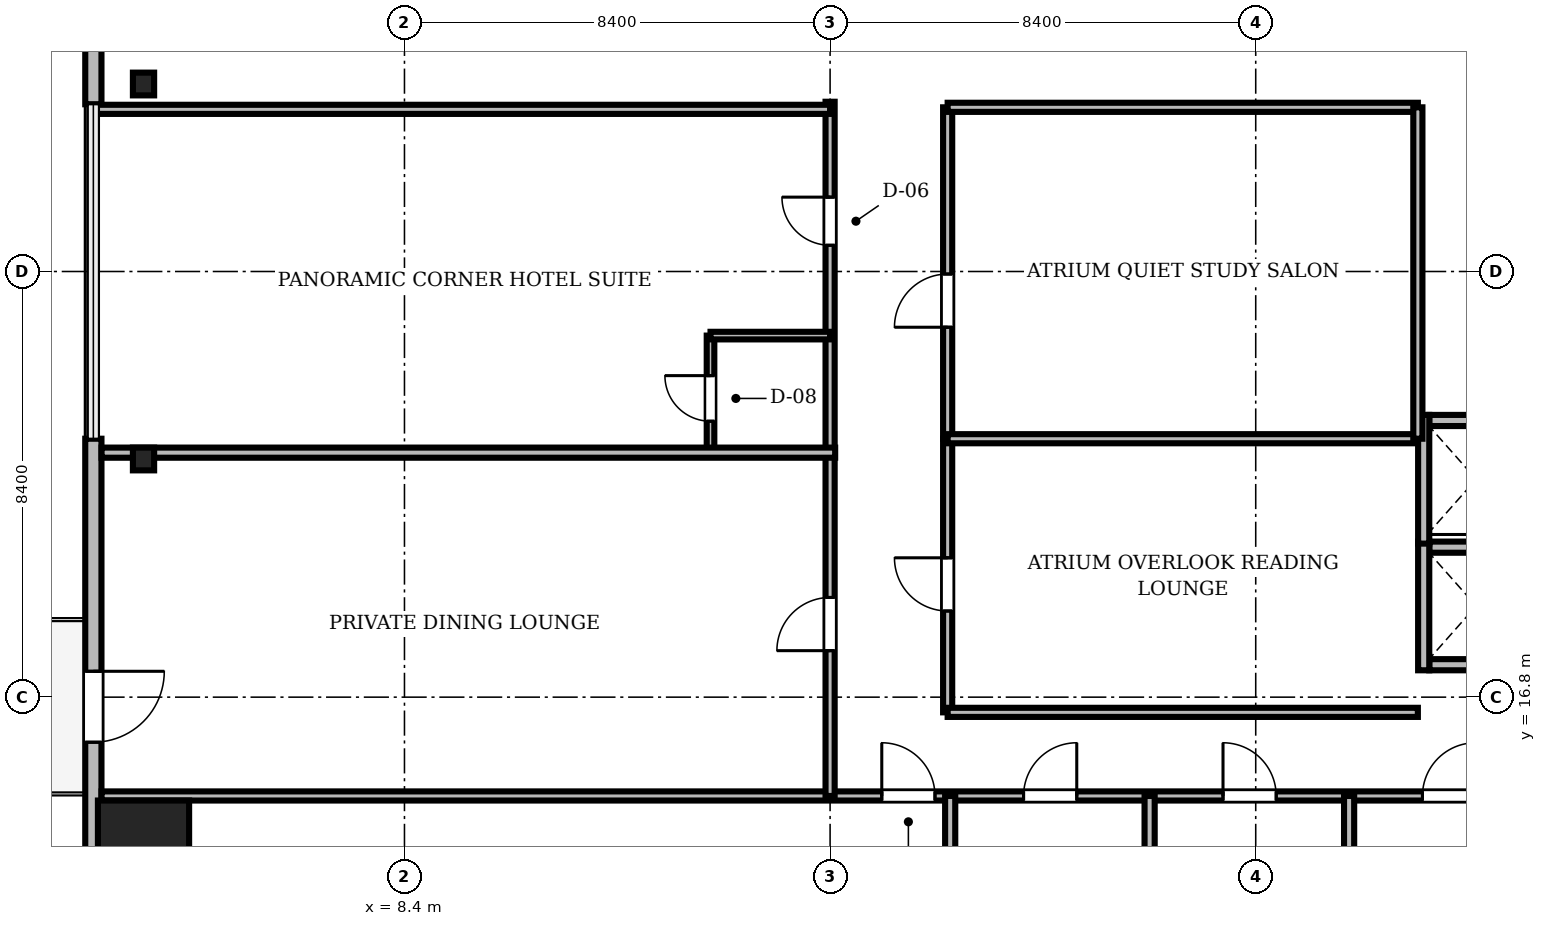
"""IFC4 building model, lengths in metres.
Left out: names, types, materials, properties, quantities, classifications, styles, units other than length and angle.
Written with IfcOpenShell. Run it as: python <this file> out.ifc"""

import sys

from ifc_helpers import new_model, si_unit, direction, frame, frame_2d, origin, origin_2d, place, context, subcontext, project, spatial, rectangle, i_section, extrude, source, transform, mapped, element, fill, save


model = new_model("IFC4")
c1 = context("Model", 3, precision=1e-05, world=origin(), true_north=direction((0.0, 1.0)))
c2 = subcontext(c1, "Body", "Model", "MODEL_VIEW")
j1 = project(units=[si_unit("LENGTHUNIT", "METRE"), si_unit("PLANEANGLEUNIT", "RADIAN")], contexts=[c1])
p1 = place(None, origin())
s1 = spatial("IfcSite", under=j1, at=p1, CompositionType="ELEMENT")
p2 = place(p1, origin())
s2 = spatial("IfcBuilding", under=s1, at=p2, CompositionType="ELEMENT")
p3 = place(p2, frame((0.0, 0.0, 53.15)))
s3 = spatial("IfcBuildingStorey", under=s2, at=p3, CompositionType="ELEMENT", Elevation=53.15)
m1 = source(origin(), c2, "Body", "SweptSolid", [
    extrude(rectangle(XDim=1.8, YDim=1.8, at=origin_2d()), origin(), (0.0, 0.0, 1.0), 3.41),
])
p4 = place(p3, frame((3.25, 13.86, 0.0), z_axis=(0.0, 0.0, 1.0), x_axis=(1.0, 0.0, 0.0)))
e1 = element("IfcColumn", 1, at=p4, inside=s3, PredefinedType="COLUMN", context=c2, shape_type="MappedRepresentation", body=[
    mapped(m1, transform((0.0, 0.0, 0.0), scale=1.0)),
])
m2 = source(origin(), c2, "Body", "SweptSolid", [
    extrude(i_section(OverallWidth=0.419, OverallDepth=0.449, WebThickness=0.031, FlangeThickness=0.048, FilletRadius=0.015, at=origin_2d()), origin(), (0.0, 0.0, 1.0), 3.41),
])
for number, where, z_axis, x_axis in (
    (2, (3.25, 28.9, 0.0), (0.0, 0.0, 1.0), (1.0, 0.0, 0.0)),
    (3, (3.25, 21.5, 0.0), (0.0, 0.0, 1.0), (1.0, 0.0, 0.0)),
):
    element("IfcColumn", number, at=place(p3, frame(where, z_axis=z_axis, x_axis=x_axis)), inside=s3, PredefinedType="COLUMN", context=c2, shape_type="MappedRepresentation", body=[
        mapped(m2, transform((0.0, 0.0, 0.0), scale=1.0)),
    ])
m3 = source(origin(), c2, "Body", "SweptSolid", [
    extrude(rectangle(XDim=15.6, YDim=0.32, at=frame_2d((7.8, 0.0))), origin(), (0.0, 0.0, 1.0), 3.41),
])
p5 = place(p3, frame((2.26, 44.1, 0.0), z_axis=(0.0, 0.0, 1.0), x_axis=(0.0, -1.0, 0.0)))
e4 = element("IfcWall", 4, at=p5, inside=s3, PredefinedType="SOLIDWALL", context=c2, shape_type="MappedRepresentation", body=[
    mapped(m3, transform((0.0, 0.0, 0.0), scale=1.0)),
])
m4 = source(origin(), c2, "Body", "SweptSolid", [
    extrude(rectangle(XDim=2.2, YDim=2.4, at=frame_2d((1.1, 1.2))), frame((0.0, 0.17, 0.0), z_axis=(0.0, -1.0, 0.0), x_axis=(1.0, 0.0, 0.0)), (0.0, 0.0, 1.0), 0.34),
])
p6 = place(p5, frame((3.005, 0.0, 0.72)))
e5 = element("IfcOpeningElement", 5, at=p6, cuts=e4, PredefinedType="OPENING", context=c2, shape_type="MappedRepresentation", body=[
    mapped(m4, transform((0.0, 0.0, 0.0), scale=1.0)),
])
m5 = source(origin(), c2, "Body", "SweptSolid", [
    extrude(rectangle(XDim=15.6, YDim=0.32, at=frame_2d((7.8, 0.0))), origin(), (0.0, 0.0, 1.0), 3.41),
])
p7 = place(p3, frame((2.26, 21.9, 0.0), z_axis=(0.0, 0.0, 1.0), x_axis=(0.0, -1.0, 0.0)))
e6 = element("IfcWall", 6, at=p7, inside=s3, PredefinedType="SOLIDWALL", context=c2, shape_type="MappedRepresentation", body=[
    mapped(m5, transform((0.0, 0.0, 0.0), scale=1.0)),
])
m6 = source(origin(), c2, "Body", "SweptSolid", [
    extrude(rectangle(XDim=1.4, YDim=2.3, at=frame_2d((0.7, 1.15))), frame((0.0, 0.17, 0.0), z_axis=(0.0, -1.0, 0.0), x_axis=(1.0, 0.0, 0.0)), (0.0, 0.0, 1.0), 0.34),
])
p8 = place(p7, frame((4.59, 0.0, 0.0)))
e7 = element("IfcOpeningElement", 7, at=p8, cuts=e6, PredefinedType="OPENING", context=c2, shape_type="MappedRepresentation", body=[
    mapped(m6, transform((0.0, 0.0, 0.0), scale=1.0)),
])
p9 = place(p7, frame((10.395, 0.0, 0.72)))
e8 = element("IfcOpeningElement", 8, at=p9, cuts=e6, PredefinedType="OPENING", context=c2, shape_type="MappedRepresentation", body=[
    mapped(m4, transform((0.0, 0.0, 0.0), scale=1.0)),
])
m7 = source(origin(), c2, "Body", "SweptSolid", [
    extrude(rectangle(XDim=1.85, YDim=0.22, at=frame_2d((0.925, 0.0))), origin(), (0.0, 0.0, 1.0), 3.41),
])
for number, where, z_axis, x_axis in (
    (9, (28.625, 17.44, 0.0), (0.0, 0.0, 1.0), (1.0, 0.0, 0.0)),
    (10, (28.625, 19.76, 0.0), (0.0, 0.0, 1.0), (1.0, 0.0, 0.0)),
):
    element("IfcWall", number, at=place(p3, frame(where, z_axis=z_axis, x_axis=x_axis)), inside=s3, PredefinedType="SOLIDWALL", context=c2, shape_type="MappedRepresentation", body=[
        mapped(m7, transform((0.0, 0.0, 0.0), scale=1.0)),
    ])
m8 = source(origin(), c2, "Body", "SweptSolid", [
    extrude(rectangle(XDim=2.54, YDim=0.22, at=frame_2d((1.27, 0.0))), origin(), (0.0, 0.0, 1.0), 3.41),
])
p10 = place(p3, frame((28.515, 17.33, 0.0), z_axis=(0.0, 0.0, 1.0), x_axis=(0.0, 1.0, 0.0)))
e11 = element("IfcWall", 11, at=p10, inside=s3, PredefinedType="SOLIDWALL", context=c2, shape_type="MappedRepresentation", body=[
    mapped(m8, transform((0.0, 0.0, 0.0), scale=1.0)),
])
p11 = place(p3, frame((28.625, 22.26, 0.0), z_axis=(0.0, 0.0, 1.0), x_axis=(1.0, 0.0, 0.0)))
e12 = element("IfcWall", 12, at=p11, inside=s3, PredefinedType="SOLIDWALL", context=c2, shape_type="MappedRepresentation", body=[
    mapped(m7, transform((0.0, 0.0, 0.0), scale=1.0)),
])
p12 = place(p3, frame((28.515, 19.83, 0.0), z_axis=(0.0, 0.0, 1.0), x_axis=(0.0, 1.0, 0.0)))
e13 = element("IfcWall", 13, at=p12, inside=s3, PredefinedType="SOLIDWALL", context=c2, shape_type="MappedRepresentation", body=[
    mapped(m8, transform((0.0, 0.0, 0.0), scale=1.0)),
])
m9 = source(origin(), c2, "Body", "SweptSolid", [
    extrude(rectangle(XDim=46.156, YDim=0.18, at=frame_2d((23.078, 0.0))), origin(), (0.0, 0.0, 1.0), 2.652),
])
p13 = place(p3, frame((2.422, 14.85, 0.0), z_axis=(0.0, 0.0, 1.0), x_axis=(1.0, 0.0, 0.0)))
e14 = element("IfcWall", 14, at=p13, inside=s3, PredefinedType="PARTITIONING", context=c2, shape_type="MappedRepresentation", body=[
    mapped(m9, transform((0.0, 0.0, 0.0), scale=1.0)),
])
m10 = source(origin(), c2, "Body", "SweptSolid", [
    extrude(rectangle(XDim=1.05, YDim=2.2, at=frame_2d((0.525, 1.1))), frame((0.0, 0.1, 0.0), z_axis=(0.0, -1.0, 0.0), x_axis=(1.0, 0.0, 0.0)), (0.0, 0.0, 1.0), 0.2),
])
p14 = place(p13, frame((15.398, 0.0, 0.0)))
e15 = element("IfcOpeningElement", 15, at=p14, cuts=e14, PredefinedType="OPENING", context=c2, shape_type="MappedRepresentation", body=[
    mapped(m10, transform((0.0, 0.0, 0.0), scale=1.0)),
])
p15 = place(p13, frame((18.196, 0.0, 0.0)))
e16 = element("IfcOpeningElement", 16, at=p15, cuts=e14, PredefinedType="OPENING", context=c2, shape_type="MappedRepresentation", body=[
    mapped(m10, transform((0.0, 0.0, 0.0), scale=1.0)),
])
p16 = place(p13, frame((22.132, 0.0, 0.0)))
e17 = element("IfcOpeningElement", 17, at=p16, cuts=e14, PredefinedType="OPENING", context=c2, shape_type="MappedRepresentation", body=[
    mapped(m10, transform((0.0, 0.0, 0.0), scale=1.0)),
])
p17 = place(p13, frame((26.069, 0.0, 0.0)))
e18 = element("IfcOpeningElement", 18, at=p17, cuts=e14, PredefinedType="OPENING", context=c2, shape_type="MappedRepresentation", body=[
    mapped(m10, transform((0.0, 0.0, 0.0), scale=1.0)),
])
p18 = place(p13, frame((30.192, 0.0, 0.0)))
e19 = element("IfcOpeningElement", 19, at=p18, cuts=e14, PredefinedType="OPENING", context=c2, shape_type="MappedRepresentation", body=[
    mapped(m10, transform((0.0, 0.0, 0.0), scale=1.0)),
])
p19 = place(p13, frame((34.128, 0.0, 0.0)))
e20 = element("IfcOpeningElement", 20, at=p19, cuts=e14, PredefinedType="OPENING", context=c2, shape_type="MappedRepresentation", body=[
    mapped(m10, transform((0.0, 0.0, 0.0), scale=1.0)),
])
p20 = place(p13, frame((37.877, 0.0, 0.0)))
e21 = element("IfcOpeningElement", 21, at=p20, cuts=e14, PredefinedType="OPENING", context=c2, shape_type="MappedRepresentation", body=[
    mapped(m10, transform((0.0, 0.0, 0.0), scale=1.0)),
])
p21 = place(p13, frame((42.727, 0.0, 0.0)))
e22 = element("IfcOpeningElement", 22, at=p21, cuts=e14, PredefinedType="OPENING", context=c2, shape_type="MappedRepresentation", body=[
    mapped(m10, transform((0.0, 0.0, 0.0), scale=1.0)),
])
m11 = source(origin(), c2, "Body", "SweptSolid", [
    extrude(rectangle(XDim=13.7, YDim=0.18, at=frame_2d((6.85, 0.0))), origin(), (0.0, 0.0, 1.0), 2.802),
])
p22 = place(p3, frame((16.8, 14.85, 0.0), z_axis=(0.0, 0.0, 1.0), x_axis=(0.0, 1.0, 0.0)))
e23 = element("IfcWall", 23, at=p22, inside=s3, PredefinedType="PARTITIONING", context=c2, shape_type="MappedRepresentation", body=[
    mapped(m11, transform((0.0, 0.0, 0.0), scale=1.0)),
])
p23 = place(p22, frame((2.867, 0.0, 0.0)))
e24 = element("IfcOpeningElement", 24, at=p23, cuts=e23, PredefinedType="OPENING", context=c2, shape_type="MappedRepresentation", body=[
    mapped(m10, transform((0.0, 0.0, 0.0), scale=1.0)),
])
m12 = source(origin(), c2, "Body", "SweptSolid", [
    extrude(rectangle(XDim=0.95, YDim=2.15, at=frame_2d((0.475, 1.075))), frame((0.0, 0.1, 0.0), z_axis=(0.0, -1.0, 0.0), x_axis=(1.0, 0.0, 0.0)), (0.0, 0.0, 1.0), 0.2),
])
p24 = place(p22, frame((10.867, 0.0, 0.0)))
e25 = element("IfcOpeningElement", 25, at=p24, cuts=e23, PredefinedType="OPENING", context=c2, shape_type="MappedRepresentation", body=[
    mapped(m12, transform((0.0, 0.0, 0.0), scale=1.0)),
])
m13 = source(origin(), c2, "Body", "SweptSolid", [
    extrude(rectangle(XDim=6.54, YDim=0.18, at=frame_2d((3.27, 0.0))), origin(), (0.0, 0.0, 1.0), 2.802),
])
p25 = place(p3, frame((19.12, 21.9, 0.0), z_axis=(0.0, 0.0, 1.0), x_axis=(0.0, 1.0, 0.0)))
e26 = element("IfcWall", 26, at=p25, inside=s3, PredefinedType="PARTITIONING", context=c2, shape_type="MappedRepresentation", body=[
    mapped(m13, transform((0.0, 0.0, 0.0), scale=1.0)),
])
p26 = place(p25, frame((2.2, 0.0, 0.0)))
e27 = element("IfcOpeningElement", 27, at=p26, cuts=e26, PredefinedType="OPENING", context=c2, shape_type="MappedRepresentation", body=[
    mapped(m10, transform((0.0, 0.0, 0.0), scale=1.0)),
])
m14 = source(origin(), c2, "Body", "SweptSolid", [
    extrude(rectangle(XDim=5.4, YDim=0.18, at=frame_2d((2.7, 0.0))), origin(), (0.0, 0.0, 1.0), 2.802),
])
p27 = place(p3, frame((19.12, 16.5, 0.0), z_axis=(0.0, 0.0, 1.0), x_axis=(0.0, 1.0, 0.0)))
e28 = element("IfcWall", 28, at=p27, inside=s3, PredefinedType="PARTITIONING", context=c2, shape_type="MappedRepresentation", body=[
    mapped(m14, transform((0.0, 0.0, 0.0), scale=1.0)),
])
p28 = place(p27, frame((2.0, 0.0, 0.0)))
e29 = element("IfcOpeningElement", 29, at=p28, cuts=e28, PredefinedType="OPENING", context=c2, shape_type="MappedRepresentation", body=[
    mapped(m10, transform((0.0, 0.0, 0.0), scale=1.0)),
])
m15 = source(origin(), c2, "Body", "SweptSolid", [
    extrude(rectangle(XDim=2.29, YDim=0.15, at=frame_2d((1.145, 0.0))), origin(), (0.0, 0.0, 1.0), 3.042),
])
p29 = place(p3, frame((14.44, 21.645, 0.0), z_axis=(0.0, 0.0, 1.0), x_axis=(0.0, 1.0, 0.0)))
e30 = element("IfcWall", 30, at=p29, inside=s3, PredefinedType="PARTITIONING", context=c2, shape_type="MappedRepresentation", body=[
    mapped(m15, transform((0.0, 0.0, 0.0), scale=1.0)),
])
m16 = source(origin(), c2, "Body", "SweptSolid", [
    extrude(rectangle(XDim=0.9, YDim=2.1, at=frame_2d((0.45, 1.05))), frame((0.0, 0.085, 0.0), z_axis=(0.0, -1.0, 0.0), x_axis=(1.0, 0.0, 0.0)), (0.0, 0.0, 1.0), 0.17),
])
p30 = place(p29, frame((0.6, 0.0, 0.0)))
e31 = element("IfcOpeningElement", 31, at=p30, cuts=e30, PredefinedType="OPENING", context=c2, shape_type="MappedRepresentation", body=[
    mapped(m16, transform((0.0, 0.0, 0.0), scale=1.0)),
])
m17 = source(origin(), c2, "Body", "SweptSolid", [
    extrude(rectangle(XDim=14.478, YDim=0.2, at=frame_2d((7.239, 0.0))), origin(), (0.0, 0.0, 1.0), 2.652),
])
p31 = place(p3, frame((2.422, 21.625, 0.0), z_axis=(0.0, 0.0, 1.0), x_axis=(1.0, 0.0, 0.0)))
e32 = element("IfcWall", 32, at=p31, inside=s3, PredefinedType="PARTITIONING", context=c2, shape_type="MappedRepresentation", body=[
    mapped(m17, transform((0.0, 0.0, 0.0), scale=1.0)),
])
m18 = source(origin(), c2, "Body", "SweptSolid", [
    extrude(rectangle(XDim=14.57, YDim=0.18, at=frame_2d((7.285, 0.0))), origin(), (0.0, 0.0, 1.0), 2.652),
])
p32 = place(p3, frame((2.23, 28.4, 0.0), z_axis=(0.0, 0.0, 1.0), x_axis=(1.0, 0.0, 0.0)))
e33 = element("IfcWall", 33, at=p32, inside=s3, PredefinedType="PARTITIONING", context=c2, shape_type="MappedRepresentation", body=[
    mapped(m18, transform((0.0, 0.0, 0.0), scale=1.0)),
])
m19 = source(origin(), c2, "Body", "SweptSolid", [
    extrude(rectangle(XDim=12.728, YDim=0.2, at=frame_2d((6.364, 0.0))), origin(), (0.0, 0.0, 1.0), 2.652),
])
p33 = place(p3, frame((19.17, 2.122, 0.0), z_axis=(0.0, 0.0, 1.0), x_axis=(0.0, 1.0, 0.0)))
e34 = element("IfcWall", 34, at=p33, inside=s3, PredefinedType="PARTITIONING", context=c2, shape_type="MappedRepresentation", body=[
    mapped(m19, transform((0.0, 0.0, 0.0), scale=1.0)),
])
m20 = source(origin(), c2, "Body", "SweptSolid", [
    extrude(rectangle(XDim=12.92, YDim=0.2, at=frame_2d((6.46, 0.0))), origin(), (0.0, 0.0, 1.0), 2.652),
])
for number, where, z_axis, x_axis in (
    (35, (23.106, 1.93, 0.0), (0.0, 0.0, 1.0), (0.0, 1.0, 0.0)),
    (36, (27.043, 1.93, 0.0), (0.0, 0.0, 1.0), (0.0, 1.0, 0.0)),
):
    element("IfcWall", number, at=place(p3, frame(where, z_axis=z_axis, x_axis=x_axis)), inside=s3, PredefinedType="PARTITIONING", context=c2, shape_type="MappedRepresentation", body=[
        mapped(m20, transform((0.0, 0.0, 0.0), scale=1.0)),
    ])
m21 = source(origin(), c2, "Body", "SweptSolid", [
    extrude(rectangle(XDim=9.28, YDim=0.18, at=frame_2d((4.64, 0.0))), origin(), (0.0, 0.0, 1.0), 2.802),
])
p34 = place(p3, frame((19.12, 16.5, 0.0), z_axis=(0.0, 0.0, 1.0), x_axis=(1.0, 0.0, 0.0)))
e37 = element("IfcWall", 37, at=p34, inside=s3, PredefinedType="PARTITIONING", context=c2, shape_type="MappedRepresentation", body=[
    mapped(m21, transform((0.0, 0.0, 0.0), scale=1.0)),
])
m22 = source(origin(), c2, "Body", "SweptSolid", [
    extrude(rectangle(XDim=9.28, YDim=0.18, at=frame_2d((4.64, 0.0))), origin(), (0.0, 0.0, 1.0), 3.41),
])
for number, where, z_axis, x_axis in (
    (38, (19.12, 21.9, 0.0), (0.0, 0.0, 1.0), (1.0, 0.0, 0.0)),
    (39, (19.12, 28.44, 0.0), (0.0, 0.0, 1.0), (1.0, 0.0, 0.0)),
):
    element("IfcWall", number, at=place(p3, frame(where, z_axis=z_axis, x_axis=x_axis)), inside=s3, PredefinedType="PARTITIONING", context=c2, shape_type="MappedRepresentation", body=[
        mapped(m22, transform((0.0, 0.0, 0.0), scale=1.0)),
    ])
p35 = place(p3, frame((28.4, 21.9, 0.0), z_axis=(0.0, 0.0, 1.0), x_axis=(0.0, 1.0, 0.0)))
e40 = element("IfcWall", 40, at=p35, inside=s3, PredefinedType="PARTITIONING", context=c2, shape_type="MappedRepresentation", body=[
    mapped(m13, transform((0.0, 0.0, 0.0), scale=1.0)),
])
m23 = source(origin(), c2, "Body", "SweptSolid", [
    extrude(rectangle(XDim=2.36, YDim=0.15, at=frame_2d((1.18, 0.0))), origin(), (0.0, 0.0, 1.0), 3.41),
])
p36 = place(p3, frame((14.44, 23.935, 0.0), z_axis=(0.0, 0.0, 1.0), x_axis=(1.0, 0.0, 0.0)))
e41 = element("IfcWall", 41, at=p36, inside=s3, PredefinedType="PARTITIONING", context=c2, shape_type="MappedRepresentation", body=[
    mapped(m23, transform((0.0, 0.0, 0.0), scale=1.0)),
])
m24 = source(origin(), c2, "Body", "SweptSolid", [
    extrude(rectangle(XDim=1.4, YDim=2.3, at=frame_2d((0.7, 1.15))), frame((0.0, 0.025, 0.0), z_axis=(0.0, -1.0, 0.0), x_axis=(1.0, 0.0, 0.0)), (0.0, 0.0, 1.0), 0.05),
])
p37 = place(p8, frame((1.4, 0.0, 0.0), z_axis=(0.0, 0.0, 1.0), x_axis=(-1.0, 0.0, 0.0)))
e42 = element("IfcDoor", 42, at=p37, inside=s3, OperationType="DOUBLE_DOOR_SLIDING", PredefinedType="DOOR", context=c2, shape_type="MappedRepresentation", body=[
    mapped(m24, transform((0.0, 0.0, 0.0), scale=1.0)),
])
fill(e7, e42)
m25 = source(origin(), c2, "Body", "SweptSolid", [
    extrude(rectangle(XDim=1.05, YDim=2.2, at=frame_2d((0.525, 1.1))), frame((0.0, 0.025, 0.0), z_axis=(0.0, -1.0, 0.0), x_axis=(1.0, 0.0, 0.0)), (0.0, 0.0, 1.0), 0.05),
])
p38 = place(p14, origin())
e43 = element("IfcDoor", 43, at=p38, inside=s3, OperationType="SINGLE_SWING_LEFT", PredefinedType="DOOR", context=c2, shape_type="MappedRepresentation", body=[
    mapped(m25, transform((0.0, 0.0, 0.0), scale=1.0)),
])
fill(e15, e43)
p39 = place(p15, origin())
e44 = element("IfcDoor", 44, at=p39, inside=s3, OperationType="SINGLE_SWING_RIGHT", PredefinedType="DOOR", context=c2, shape_type="MappedRepresentation", body=[
    mapped(m25, transform((0.0, 0.0, 0.0), scale=1.0)),
])
fill(e16, e44)
p40 = place(p16, origin())
e45 = element("IfcDoor", 45, at=p40, inside=s3, OperationType="SINGLE_SWING_LEFT", PredefinedType="DOOR", context=c2, shape_type="MappedRepresentation", body=[
    mapped(m25, transform((0.0, 0.0, 0.0), scale=1.0)),
])
fill(e17, e45)
p41 = place(p17, origin())
e46 = element("IfcDoor", 46, at=p41, inside=s3, OperationType="SINGLE_SWING_RIGHT", PredefinedType="DOOR", context=c2, shape_type="MappedRepresentation", body=[
    mapped(m25, transform((0.0, 0.0, 0.0), scale=1.0)),
])
fill(e18, e46)
p42 = place(p23, origin())
e47 = element("IfcDoor", 47, at=p42, inside=s3, OperationType="SINGLE_SWING_LEFT", PredefinedType="DOOR", context=c2, shape_type="MappedRepresentation", body=[
    mapped(m25, transform((0.0, 0.0, 0.0), scale=1.0)),
])
fill(e24, e47)
m26 = source(origin(), c2, "Body", "SweptSolid", [
    extrude(rectangle(XDim=0.95, YDim=2.15, at=frame_2d((0.475, 1.075))), frame((0.0, 0.025, 0.0), z_axis=(0.0, -1.0, 0.0), x_axis=(1.0, 0.0, 0.0)), (0.0, 0.0, 1.0), 0.05),
])
p43 = place(p24, origin())
e48 = element("IfcDoor", 48, at=p43, inside=s3, OperationType="SINGLE_SWING_RIGHT", PredefinedType="DOOR", context=c2, shape_type="MappedRepresentation", body=[
    mapped(m26, transform((0.0, 0.0, 0.0), scale=1.0)),
])
fill(e25, e48)
p44 = place(p26, origin())
e49 = element("IfcDoor", 49, at=p44, inside=s3, OperationType="SINGLE_SWING_LEFT", PredefinedType="DOOR", context=c2, shape_type="MappedRepresentation", body=[
    mapped(m25, transform((0.0, 0.0, 0.0), scale=1.0)),
])
fill(e27, e49)
p45 = place(p28, origin())
e50 = element("IfcDoor", 50, at=p45, inside=s3, OperationType="SINGLE_SWING_RIGHT", PredefinedType="DOOR", context=c2, shape_type="MappedRepresentation", body=[
    mapped(m25, transform((0.0, 0.0, 0.0), scale=1.0)),
])
fill(e29, e50)
m27 = source(origin(), c2, "Body", "SweptSolid", [
    extrude(rectangle(XDim=0.9, YDim=2.1, at=frame_2d((0.45, 1.05))), frame((0.0, 0.025, 0.0), z_axis=(0.0, -1.0, 0.0), x_axis=(1.0, 0.0, 0.0)), (0.0, 0.0, 1.0), 0.05),
])
p46 = place(p30, origin())
e51 = element("IfcDoor", 51, at=p46, inside=s3, OperationType="SINGLE_SWING_RIGHT", PredefinedType="DOOR", context=c2, shape_type="MappedRepresentation", body=[
    mapped(m27, transform((0.0, 0.0, 0.0), scale=1.0)),
])
fill(e31, e51)
save(model, sys.argv[1])
